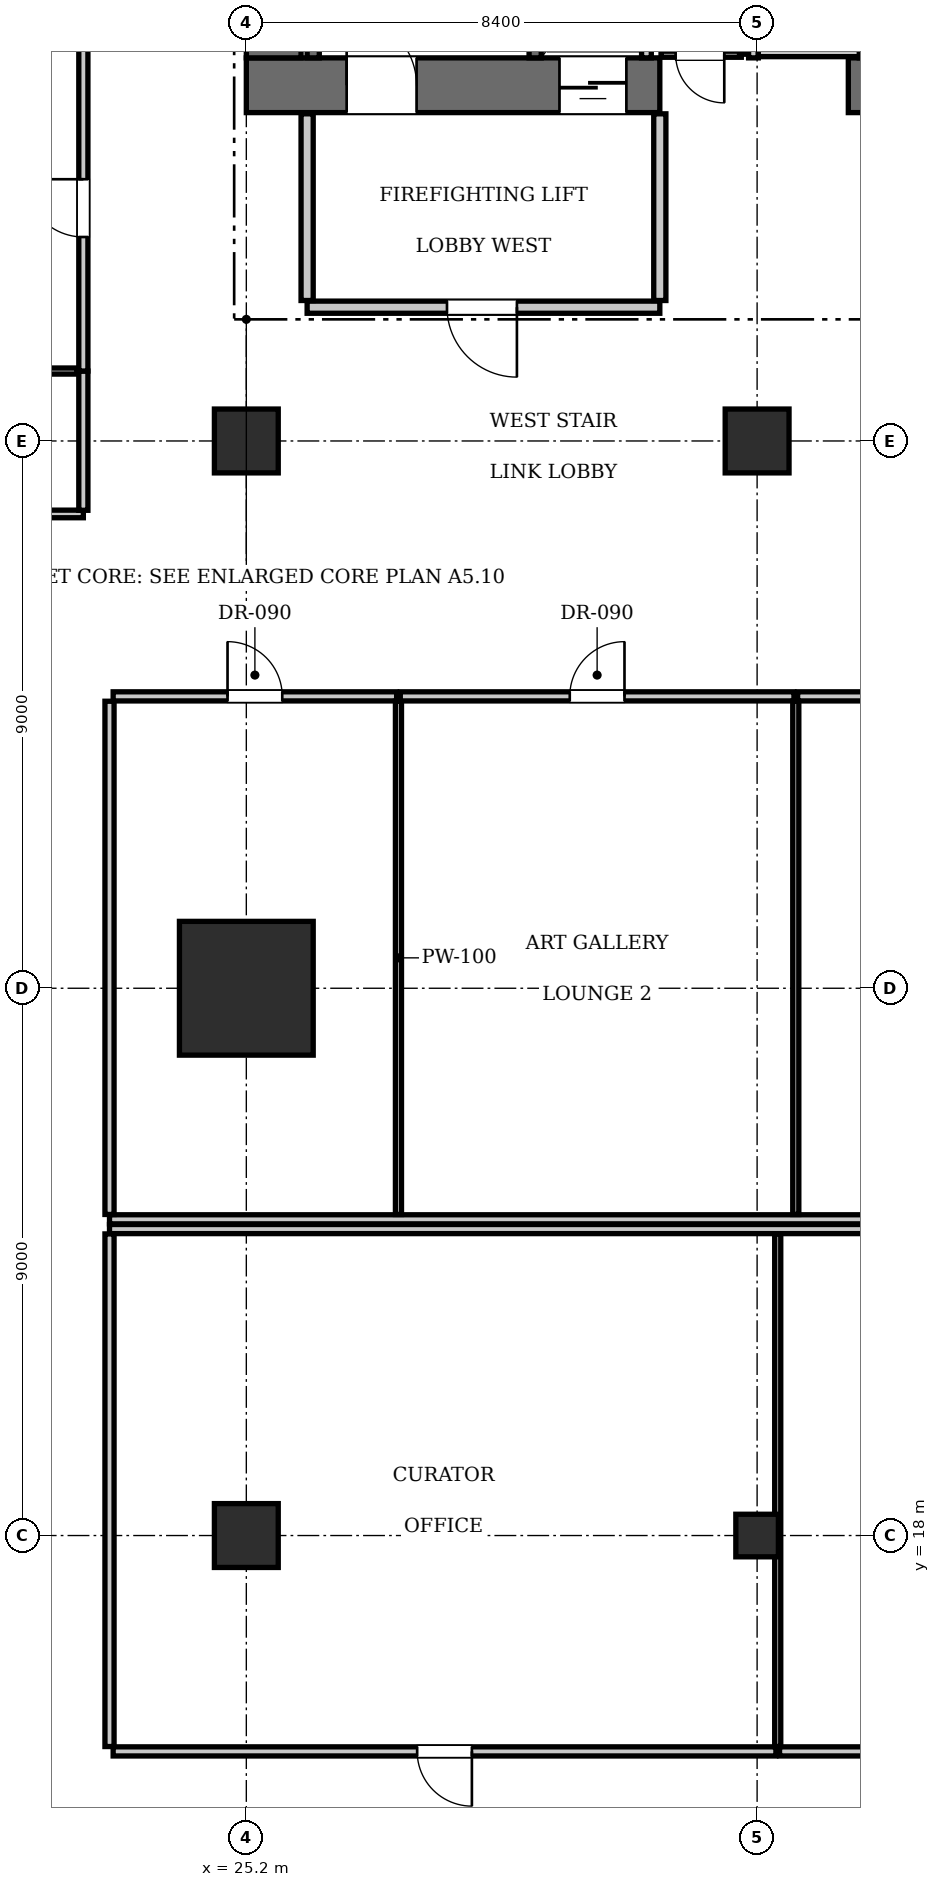
"""IFC4 building model, lengths in metres.
Left out: names, types, materials, properties, quantities, classifications, styles, units other than length and angle.
Written with IfcOpenShell. Run it as: python <this file> out.ifc"""

import sys

from ifc_helpers import new_model, si_unit, direction, frame, frame_2d, origin, origin_2d, place, context, subcontext, project, spatial, rectangle, i_section, extrude, element, fill, save


model = new_model("IFC4")
c1 = context("Model", 3, precision=1e-05, world=origin(), true_north=direction((0.0, 1.0)))
c2 = subcontext(c1, "Body", "Model", "MODEL_VIEW")
j1 = project(units=[si_unit("LENGTHUNIT", "METRE"), si_unit("PLANEANGLEUNIT", "RADIAN")], contexts=[c1])
p1 = place(None, origin())
s1 = spatial("IfcSite", under=j1, at=p1, CompositionType="ELEMENT")
p2 = place(p1, origin())
s2 = spatial("IfcBuilding", under=s1, at=p2, CompositionType="ELEMENT")
p3 = place(p2, frame((0.0, 0.0, 92.4)))
s3 = spatial("IfcBuildingStorey", under=s2, at=p3, CompositionType="ELEMENT", Elevation=92.4)
p4 = place(p3, frame((25.2, 27.0, 0.0), z_axis=(0.0, 0.0, 1.0), x_axis=(1.0, 0.0, 0.0)))
e1 = element("IfcColumn", 1, at=p4, inside=s3, PredefinedType="COLUMN", context=c2, shape_type="SweptSolid", body=[
    extrude(rectangle(XDim=2.2, YDim=2.2, at=origin_2d()), origin(), (0.0, 0.0, 1.0), 3.85),
])
p5 = place(p3, frame((25.2, 41.85, 0.0), z_axis=(0.0, 0.0, 1.0), x_axis=(1.0, 0.0, 0.0)))
e2 = element("IfcWall", 2, at=p5, inside=s3, PredefinedType="SHEAR", context=c2, shape_type="SweptSolid", body=[
    extrude(rectangle(XDim=6.8, YDim=0.9, at=frame_2d((3.4, 0.0))), origin(), (0.0, 0.0, 1.0), 3.85),
])
p6 = place(p5, frame((1.65, 0.0, 0.0)))
e3 = element("IfcOpeningElement", 3, at=p6, cuts=e2, PredefinedType="OPENING", context=c2, shape_type="SweptSolid", body=[
    extrude(rectangle(XDim=1.15, YDim=2.15, at=frame_2d((0.575, 1.075))), frame((0.0, 0.46, 0.0), z_axis=(0.0, -1.0, 0.0), x_axis=(1.0, 0.0, 0.0)), (0.0, 0.0, 1.0), 0.92),
])
p7 = place(p5, frame((5.15, 0.0, 0.0)))
e4 = element("IfcOpeningElement", 4, at=p7, cuts=e2, PredefinedType="OPENING", context=c2, shape_type="SweptSolid", body=[
    extrude(rectangle(XDim=1.1, YDim=2.2, at=frame_2d((0.55, 1.1))), frame((0.0, 0.46, 0.0), z_axis=(0.0, -1.0, 0.0), x_axis=(1.0, 0.0, 0.0)), (0.0, 0.0, 1.0), 0.92),
])
p8 = place(p3, frame((35.1, 41.85, 0.0), z_axis=(0.0, 0.0, 1.0), x_axis=(1.0, 0.0, 0.0)))
e5 = element("IfcWall", 5, at=p8, inside=s3, PredefinedType="SHEAR", context=c2, shape_type="SweptSolid", body=[
    extrude(rectangle(XDim=5.4, YDim=0.9, at=frame_2d((2.7, 0.0))), origin(), (0.0, 0.0, 1.0), 3.85),
])
p9 = place(p3, frame((25.65, 42.3, 0.0), z_axis=(0.0, 0.0, 1.0), x_axis=(0.0, 1.0, 0.0)))
e6 = element("IfcWall", 6, at=p9, inside=s3, PredefinedType="SHEAR", context=c2, shape_type="SweptSolid", body=[
    extrude(rectangle(XDim=1.6, YDim=0.9, at=frame_2d((0.8, 0.0))), origin(), (0.0, 0.0, 1.0), 3.85),
])
for number, where, z_axis, x_axis in (
    (7, (25.2, 36.0, 0.0), (0.0, 0.0, 1.0), (1.0, 0.0, 0.0)),
    (8, (33.6, 36.0, 0.0), (0.0, 0.0, 1.0), (1.0, 0.0, 0.0)),
    (9, (25.2, 18.0, 0.0), (0.0, 0.0, 1.0), (1.0, 0.0, 0.0)),
):
    element("IfcColumn", number, at=place(p3, frame(where, z_axis=z_axis, x_axis=x_axis)), inside=s3, PredefinedType="COLUMN", context=c2, shape_type="SweptSolid", body=[
        extrude(rectangle(XDim=1.05, YDim=1.05, at=origin_2d()), origin(), (0.0, 0.0, 1.0), 3.85),
    ])
p10 = place(p3, frame((33.6, 18.0, 0.0), z_axis=(0.0, 0.0, 1.0), x_axis=(1.0, 0.0, 0.0)))
e10 = element("IfcColumn", 10, at=p10, inside=s3, PredefinedType="COLUMN", context=c2, shape_type="SweptSolid", body=[
    extrude(i_section(OverallWidth=0.7, OverallDepth=0.7, WebThickness=0.028, FlangeThickness=0.044, at=origin_2d()), origin(), (0.0, 0.0, 1.0), 3.85),
])
p11 = place(p3, frame((29.95, 42.3, 0.0), z_axis=(0.0, 0.0, 1.0), x_axis=(0.0, 1.0, 0.0)))
e11 = element("IfcWall", 11, at=p11, inside=s3, PredefinedType="SOLIDWALL", context=c2, shape_type="SweptSolid", body=[
    extrude(rectangle(XDim=8.85, YDim=0.2, at=frame_2d((4.425, 0.0))), origin(), (0.0, 0.0, 1.0), 3.61),
])
p12 = place(p3, frame((26.3, 42.3, 0.0), z_axis=(0.0, 0.0, 1.0), x_axis=(0.0, 1.0, 0.0)))
e12 = element("IfcWall", 12, at=p12, inside=s3, PredefinedType="SOLIDWALL", context=c2, shape_type="SweptSolid", body=[
    extrude(rectangle(XDim=1.58, YDim=0.2, at=frame_2d((0.79, 0.0))), origin(), (0.0, 0.0, 1.0), 3.61),
])
p13 = place(p3, frame((31.78, 42.3, 0.0), z_axis=(0.0, 0.0, 1.0), x_axis=(0.0, 1.0, 0.0)))
e13 = element("IfcWall", 13, at=p13, inside=s3, PredefinedType="SOLIDWALL", context=c2, shape_type="SweptSolid", body=[
    extrude(rectangle(XDim=2.44, YDim=0.16, at=frame_2d((1.22, 0.0))), origin(), (0.0, 0.0, 1.0), 3.61),
])
for number, where, z_axis, x_axis in (
    (14, (33.54, 42.3, 0.0), (0.0, 0.0, 1.0), (0.0, 1.0, 0.0)),
    (15, (35.36, 42.3, 0.0), (0.0, 0.0, 1.0), (0.0, 1.0, 0.0)),
):
    element("IfcWall", number, at=place(p3, frame(where, z_axis=z_axis, x_axis=x_axis)), inside=s3, PredefinedType="SOLIDWALL", context=c2, shape_type="SweptSolid", body=[
        extrude(rectangle(XDim=2.1, YDim=0.16, at=frame_2d((1.05, 0.0))), origin(), (0.0, 0.0, 1.0), 3.61),
    ])
p14 = place(p3, frame((33.62, 42.4, 0.0), z_axis=(0.0, 0.0, 1.0), x_axis=(1.0, 0.0, 0.0)))
e16 = element("IfcWall", 16, at=p14, inside=s3, PredefinedType="SOLIDWALL", context=c2, shape_type="SweptSolid", body=[
    extrude(rectangle(XDim=1.66, YDim=0.16, at=frame_2d((0.83, 0.0))), origin(), (0.0, 0.0, 1.0), 3.61),
])
p15 = place(p3, frame((26.2, 38.2, 0.0), z_axis=(0.0, 0.0, 1.0), x_axis=(1.0, 0.0, 0.0)))
e17 = element("IfcWall", 17, at=p15, inside=s3, PredefinedType="PARTITIONING", context=c2, shape_type="SweptSolid", body=[
    extrude(rectangle(XDim=5.8, YDim=0.2, at=frame_2d((2.9, 0.0))), origin(), (0.0, 0.0, 1.0), 3.61),
])
p16 = place(p15, frame((2.3, 0.0, 0.0)))
e18 = element("IfcOpeningElement", 18, at=p16, cuts=e17, PredefinedType="OPENING", context=c2, shape_type="SweptSolid", body=[
    extrude(rectangle(XDim=1.15, YDim=2.15, at=frame_2d((0.575, 1.075))), frame((0.0, 0.11, 0.0), z_axis=(0.0, -1.0, 0.0), x_axis=(1.0, 0.0, 0.0)), (0.0, 0.0, 1.0), 0.22),
])
for number, where, z_axis, x_axis in (
    (19, (26.2, 38.31, 0.0), (0.0, 0.0, 1.0), (0.0, 1.0, 0.0)),
    (20, (32.0, 38.31, 0.0), (0.0, 0.0, 1.0), (0.0, 1.0, 0.0)),
):
    element("IfcWall", number, at=place(p3, frame(where, z_axis=z_axis, x_axis=x_axis)), inside=s3, PredefinedType="PARTITIONING", context=c2, shape_type="SweptSolid", body=[
        extrude(rectangle(XDim=3.07, YDim=0.2, at=frame_2d((1.535, 0.0))), origin(), (0.0, 0.0, 1.0), 3.61),
    ])
p17 = place(p3, frame((32.02, 42.36, 0.0), z_axis=(0.0, 0.0, 1.0), x_axis=(1.0, 0.0, 0.0)))
e21 = element("IfcWall", 21, at=p17, inside=s3, PredefinedType="PARTITIONING", context=c2, shape_type="SweptSolid", body=[
    extrude(rectangle(XDim=1.32, YDim=0.1, at=frame_2d((0.66, 0.0))), origin(), (0.0, 0.0, 1.0), 3.61),
])
p18 = place(p17, frame((0.24, 0.0, 0.0)))
e22 = element("IfcOpeningElement", 22, at=p18, cuts=e21, PredefinedType="OPENING", context=c2, shape_type="SweptSolid", body=[
    extrude(rectangle(XDim=0.8, YDim=2.05, at=frame_2d((0.4, 1.025))), frame((0.0, 0.06, 0.0), z_axis=(0.0, -1.0, 0.0), x_axis=(1.0, 0.0, 0.0)), (0.0, 0.0, 1.0), 0.12),
])
p19 = place(p3, frame((33.36, 42.36, 0.0), z_axis=(0.0, 0.0, 1.0), x_axis=(0.0, 1.0, 0.0)))
e23 = element("IfcWall", 23, at=p19, inside=s3, PredefinedType="PARTITIONING", context=c2, shape_type="SweptSolid", body=[
    extrude(rectangle(XDim=2.58, YDim=0.1, at=frame_2d((1.29, 0.0))), origin(), (0.0, 0.0, 1.0), 3.61),
])
p20 = place(p3, frame((22.95, 23.2, 0.0), z_axis=(0.0, 0.0, 1.0), x_axis=(1.0, 0.0, 0.0)))
e24 = element("IfcWall", 24, at=p20, inside=s3, PredefinedType="PARTITIONING", context=c2, shape_type="SweptSolid", body=[
    extrude(rectangle(XDim=29.7, YDim=0.15, at=frame_2d((14.85, 0.0))), origin(), (0.0, 0.0, 1.0), 3.61),
])
p21 = place(p3, frame((22.95, 23.28, 0.0), z_axis=(0.0, 0.0, 1.0), x_axis=(0.0, 1.0, 0.0)))
e25 = element("IfcWall", 25, at=p21, inside=s3, PredefinedType="PARTITIONING", context=c2, shape_type="SweptSolid", body=[
    extrude(rectangle(XDim=8.44, YDim=0.15, at=frame_2d((4.22, 0.0))), origin(), (0.0, 0.0, 1.0), 3.61),
])
p22 = place(p3, frame((23.01, 31.8, 0.0), z_axis=(0.0, 0.0, 1.0), x_axis=(1.0, 0.0, 0.0)))
e26 = element("IfcWall", 26, at=p22, inside=s3, PredefinedType="PARTITIONING", context=c2, shape_type="SweptSolid", body=[
    extrude(rectangle(XDim=4.662, YDim=0.15, at=frame_2d((2.331, 0.0))), origin(), (0.0, 0.0, 1.0), 3.61),
])
p23 = place(p22, frame((1.881, 0.0, 0.0)))
e27 = element("IfcOpeningElement", 27, at=p23, cuts=e26, PredefinedType="OPENING", context=c2, shape_type="SweptSolid", body=[
    extrude(rectangle(XDim=0.9, YDim=2.1, at=frame_2d((0.45, 1.05))), frame((0.0, 0.085, 0.0), z_axis=(0.0, -1.0, 0.0), x_axis=(1.0, 0.0, 0.0)), (0.0, 0.0, 1.0), 0.17),
])
p24 = place(p3, frame((27.702, 23.28, 0.0), z_axis=(0.0, 0.0, 1.0), x_axis=(0.0, 1.0, 0.0)))
e28 = element("IfcWall", 28, at=p24, inside=s3, PredefinedType="PARTITIONING", context=c2, shape_type="SweptSolid", body=[
    extrude(rectangle(XDim=8.44, YDim=0.1, at=frame_2d((4.22, 0.0))), origin(), (0.0, 0.0, 1.0), 3.61),
])
p25 = place(p3, frame((27.732, 31.8, 0.0), z_axis=(0.0, 0.0, 1.0), x_axis=(1.0, 0.0, 0.0)))
e29 = element("IfcWall", 29, at=p25, inside=s3, PredefinedType="PARTITIONING", context=c2, shape_type="SweptSolid", body=[
    extrude(rectangle(XDim=6.474, YDim=0.15, at=frame_2d((3.237, 0.0))), origin(), (0.0, 0.0, 1.0), 3.61),
])
p26 = place(p25, frame((2.787, 0.0, 0.0)))
e30 = element("IfcOpeningElement", 30, at=p26, cuts=e29, PredefinedType="OPENING", context=c2, shape_type="SweptSolid", body=[
    extrude(rectangle(XDim=0.9, YDim=2.1, at=frame_2d((0.45, 1.05))), frame((0.0, 0.085, 0.0), z_axis=(0.0, -1.0, 0.0), x_axis=(1.0, 0.0, 0.0)), (0.0, 0.0, 1.0), 0.17),
])
p27 = place(p3, frame((34.236, 23.28, 0.0), z_axis=(0.0, 0.0, 1.0), x_axis=(0.0, 1.0, 0.0)))
e31 = element("IfcWall", 31, at=p27, inside=s3, PredefinedType="PARTITIONING", context=c2, shape_type="SweptSolid", body=[
    extrude(rectangle(XDim=8.44, YDim=0.1, at=frame_2d((4.22, 0.0))), origin(), (0.0, 0.0, 1.0), 3.61),
])
p28 = place(p3, frame((34.266, 31.8, 0.0), z_axis=(0.0, 0.0, 1.0), x_axis=(1.0, 0.0, 0.0)))
e32 = element("IfcWall", 32, at=p28, inside=s3, PredefinedType="PARTITIONING", context=c2, shape_type="SweptSolid", body=[
    extrude(rectangle(XDim=8.256, YDim=0.15, at=frame_2d((4.128, 0.0))), origin(), (0.0, 0.0, 1.0), 3.61),
])
p29 = place(p28, frame((3.678, 0.0, 0.0)))
e33 = element("IfcOpeningElement", 33, at=p29, cuts=e32, PredefinedType="OPENING", context=c2, shape_type="SweptSolid", body=[
    extrude(rectangle(XDim=0.9, YDim=2.1, at=frame_2d((0.45, 1.05))), frame((0.0, 0.085, 0.0), z_axis=(0.0, -1.0, 0.0), x_axis=(1.0, 0.0, 0.0)), (0.0, 0.0, 1.0), 0.17),
])
p30 = place(p3, frame((22.95, 23.04, 0.0), z_axis=(0.0, 0.0, 1.0), x_axis=(1.0, 0.0, 0.0)))
e34 = element("IfcWall", 34, at=p30, inside=s3, PredefinedType="PARTITIONING", context=c2, shape_type="SweptSolid", body=[
    extrude(rectangle(XDim=29.7, YDim=0.15, at=frame_2d((14.85, 0.0))), origin(), (0.0, 0.0, 1.0), 3.61),
])
p31 = place(p3, frame((22.95, 14.53, 0.0), z_axis=(0.0, 0.0, 1.0), x_axis=(0.0, 1.0, 0.0)))
e35 = element("IfcWall", 35, at=p31, inside=s3, PredefinedType="PARTITIONING", context=c2, shape_type="SweptSolid", body=[
    extrude(rectangle(XDim=8.43, YDim=0.15, at=frame_2d((4.215, 0.0))), origin(), (0.0, 0.0, 1.0), 3.61),
])
p32 = place(p3, frame((23.01, 14.45, 0.0), z_axis=(0.0, 0.0, 1.0), x_axis=(1.0, 0.0, 0.0)))
e36 = element("IfcWall", 36, at=p32, inside=s3, PredefinedType="PARTITIONING", context=c2, shape_type="SweptSolid", body=[
    extrude(rectangle(XDim=10.899, YDim=0.15, at=frame_2d((5.449, 0.0))), origin(), (0.0, 0.0, 1.0), 3.61),
])
p33 = place(p32, frame((5.0, 0.0, 0.0)))
e37 = element("IfcOpeningElement", 37, at=p33, cuts=e36, PredefinedType="OPENING", context=c2, shape_type="SweptSolid", body=[
    extrude(rectangle(XDim=0.9, YDim=2.1, at=frame_2d((0.45, 1.05))), frame((0.0, 0.085, 0.0), z_axis=(0.0, -1.0, 0.0), x_axis=(1.0, 0.0, 0.0)), (0.0, 0.0, 1.0), 0.17),
])
p34 = place(p3, frame((33.939, 14.53, 0.0), z_axis=(0.0, 0.0, 1.0), x_axis=(0.0, 1.0, 0.0)))
e38 = element("IfcWall", 38, at=p34, inside=s3, PredefinedType="PARTITIONING", context=c2, shape_type="SweptSolid", body=[
    extrude(rectangle(XDim=8.43, YDim=0.1, at=frame_2d((4.215, 0.0))), origin(), (0.0, 0.0, 1.0), 3.61),
])
p35 = place(p3, frame((33.969, 14.45, 0.0), z_axis=(0.0, 0.0, 1.0), x_axis=(1.0, 0.0, 0.0)))
e39 = element("IfcWall", 39, at=p35, inside=s3, PredefinedType="PARTITIONING", context=c2, shape_type="SweptSolid", body=[
    extrude(rectangle(XDim=18.621, YDim=0.15, at=frame_2d((9.311, 0.0))), origin(), (0.0, 0.0, 1.0), 3.61),
])
p36 = place(p35, frame((8.861, 0.0, 0.0)))
e40 = element("IfcOpeningElement", 40, at=p36, cuts=e39, PredefinedType="OPENING", context=c2, shape_type="SweptSolid", body=[
    extrude(rectangle(XDim=0.9, YDim=2.1, at=frame_2d((0.45, 1.05))), frame((0.0, 0.085, 0.0), z_axis=(0.0, -1.0, 0.0), x_axis=(1.0, 0.0, 0.0)), (0.0, 0.0, 1.0), 0.17),
])
p37 = place(p3, frame((10.9, 34.8, 0.0), z_axis=(0.0, 0.0, 1.0), x_axis=(1.0, 0.0, 0.0)))
e41 = element("IfcWall", 41, at=p37, inside=s3, PredefinedType="PARTITIONING", context=c2, shape_type="SweptSolid", body=[
    extrude(rectangle(XDim=11.62, YDim=0.125, at=frame_2d((5.81, 0.0))), origin(), (0.0, 0.0, 1.0), 3.61),
])
p38 = place(p3, frame((22.52, 34.86, 0.0), z_axis=(0.0, 0.0, 1.0), x_axis=(0.0, 1.0, 0.0)))
e42 = element("IfcWall", 42, at=p38, inside=s3, PredefinedType="PARTITIONING", context=c2, shape_type="SweptSolid", body=[
    extrude(rectangle(XDim=2.29, YDim=0.15, at=frame_2d((1.145, 0.0))), origin(), (0.0, 0.0, 1.0), 3.61),
])
p39 = place(p3, frame((22.52, 37.15, 0.0), z_axis=(0.0, 0.0, 1.0), x_axis=(0.0, 1.0, 0.0)))
e43 = element("IfcWall", 43, at=p39, inside=s3, PredefinedType="PARTITIONING", context=c2, shape_type="SweptSolid", body=[
    extrude(rectangle(XDim=5.359, YDim=0.15, at=frame_2d((2.679, 0.0))), origin(), (0.0, 0.0, 1.0), 3.61),
])
p40 = place(p39, frame((2.204, 0.0, 0.0)))
e44 = element("IfcOpeningElement", 44, at=p40, cuts=e43, PredefinedType="OPENING", context=c2, shape_type="SweptSolid", body=[
    extrude(rectangle(XDim=0.95, YDim=2.15, at=frame_2d((0.475, 1.075))), frame((0.0, 0.085, 0.0), z_axis=(0.0, -1.0, 0.0), x_axis=(1.0, 0.0, 0.0)), (0.0, 0.0, 1.0), 0.17),
])
p41 = place(p3, frame((20.12, 37.15, 0.0), z_axis=(0.0, 0.0, 1.0), x_axis=(1.0, 0.0, 0.0)))
e45 = element("IfcWall", 45, at=p41, inside=s3, PredefinedType="PARTITIONING", context=c2, shape_type="SweptSolid", body=[
    extrude(rectangle(XDim=2.3, YDim=0.1, at=frame_2d((1.15, 0.0))), origin(), (0.0, 0.0, 1.0), 3.61),
])
p42 = place(p41, frame((0.35, 0.0, 0.0)))
e46 = element("IfcOpeningElement", 46, at=p42, cuts=e45, PredefinedType="OPENING", context=c2, shape_type="SweptSolid", body=[
    extrude(rectangle(XDim=0.85, YDim=2.1, at=frame_2d((0.425, 1.05))), frame((0.0, 0.06, 0.0), z_axis=(0.0, -1.0, 0.0), x_axis=(1.0, 0.0, 0.0)), (0.0, 0.0, 1.0), 0.12),
])
p43 = place(p6, origin())
e47 = element("IfcDoor", 47, at=p43, inside=s3, OperationType="SINGLE_SWING_LEFT", PredefinedType="DOOR", context=c2, shape_type="SweptSolid", body=[
    extrude(rectangle(XDim=1.15, YDim=2.15, at=frame_2d((0.575, 1.075))), frame((0.0, 0.025, 0.0), z_axis=(0.0, -1.0, 0.0), x_axis=(1.0, 0.0, 0.0)), (0.0, 0.0, 1.0), 0.05),
])
fill(e3, e47)
p44 = place(p7, frame((1.1, 0.0, 0.0), z_axis=(0.0, 0.0, 1.0), x_axis=(-1.0, 0.0, 0.0)))
e48 = element("IfcDoor", 48, at=p44, inside=s3, OperationType="SLIDING_TO_LEFT", PredefinedType="DOOR", context=c2, shape_type="SweptSolid", body=[
    extrude(rectangle(XDim=1.1, YDim=2.2, at=frame_2d((0.55, 1.1))), frame((0.0, 0.025, 0.0), z_axis=(0.0, -1.0, 0.0), x_axis=(1.0, 0.0, 0.0)), (0.0, 0.0, 1.0), 0.05),
])
fill(e4, e48)
p45 = place(p16, frame((1.15, 0.0, 0.0), z_axis=(0.0, 0.0, 1.0), x_axis=(-1.0, 0.0, 0.0)))
e49 = element("IfcDoor", 49, at=p45, inside=s3, OperationType="SINGLE_SWING_LEFT", PredefinedType="DOOR", context=c2, shape_type="SweptSolid", body=[
    extrude(rectangle(XDim=1.15, YDim=2.15, at=frame_2d((0.575, 1.075))), frame((0.0, 0.025, 0.0), z_axis=(0.0, -1.0, 0.0), x_axis=(1.0, 0.0, 0.0)), (0.0, 0.0, 1.0), 0.05),
])
fill(e18, e49)
p46 = place(p18, frame((0.8, 0.0, 0.0), z_axis=(0.0, 0.0, 1.0), x_axis=(-1.0, 0.0, 0.0)))
e50 = element("IfcDoor", 50, at=p46, inside=s3, OperationType="SINGLE_SWING_LEFT", PredefinedType="DOOR", context=c2, shape_type="SweptSolid", body=[
    extrude(rectangle(XDim=0.8, YDim=2.05, at=frame_2d((0.4, 1.025))), frame((0.0, 0.025, 0.0), z_axis=(0.0, -1.0, 0.0), x_axis=(1.0, 0.0, 0.0)), (0.0, 0.0, 1.0), 0.05),
])
fill(e22, e50)
p47 = place(p23, origin())
e51 = element("IfcDoor", 51, at=p47, inside=s3, OperationType="SINGLE_SWING_LEFT", PredefinedType="DOOR", context=c2, shape_type="SweptSolid", body=[
    extrude(rectangle(XDim=0.9, YDim=2.1, at=frame_2d((0.45, 1.05))), frame((0.0, 0.025, 0.0), z_axis=(0.0, -1.0, 0.0), x_axis=(1.0, 0.0, 0.0)), (0.0, 0.0, 1.0), 0.05),
])
fill(e27, e51)
p48 = place(p26, origin())
e52 = element("IfcDoor", 52, at=p48, inside=s3, OperationType="SINGLE_SWING_RIGHT", PredefinedType="DOOR", context=c2, shape_type="SweptSolid", body=[
    extrude(rectangle(XDim=0.9, YDim=2.1, at=frame_2d((0.45, 1.05))), frame((0.0, 0.025, 0.0), z_axis=(0.0, -1.0, 0.0), x_axis=(1.0, 0.0, 0.0)), (0.0, 0.0, 1.0), 0.05),
])
fill(e30, e52)
p49 = place(p33, frame((0.9, 0.0, 0.0), z_axis=(0.0, 0.0, 1.0), x_axis=(-1.0, 0.0, 0.0)))
e53 = element("IfcDoor", 53, at=p49, inside=s3, OperationType="SINGLE_SWING_LEFT", PredefinedType="DOOR", context=c2, shape_type="SweptSolid", body=[
    extrude(rectangle(XDim=0.9, YDim=2.1, at=frame_2d((0.45, 1.05))), frame((0.0, 0.025, 0.0), z_axis=(0.0, -1.0, 0.0), x_axis=(1.0, 0.0, 0.0)), (0.0, 0.0, 1.0), 0.05),
])
fill(e37, e53)
p50 = place(p40, origin())
e54 = element("IfcDoor", 54, at=p50, inside=s3, OperationType="SINGLE_SWING_RIGHT", PredefinedType="DOOR", context=c2, shape_type="SweptSolid", body=[
    extrude(rectangle(XDim=0.95, YDim=2.15, at=frame_2d((0.475, 1.075))), frame((0.0, 0.025, 0.0), z_axis=(0.0, -1.0, 0.0), x_axis=(1.0, 0.0, 0.0)), (0.0, 0.0, 1.0), 0.05),
])
fill(e44, e54)
save(model, sys.argv[1])
